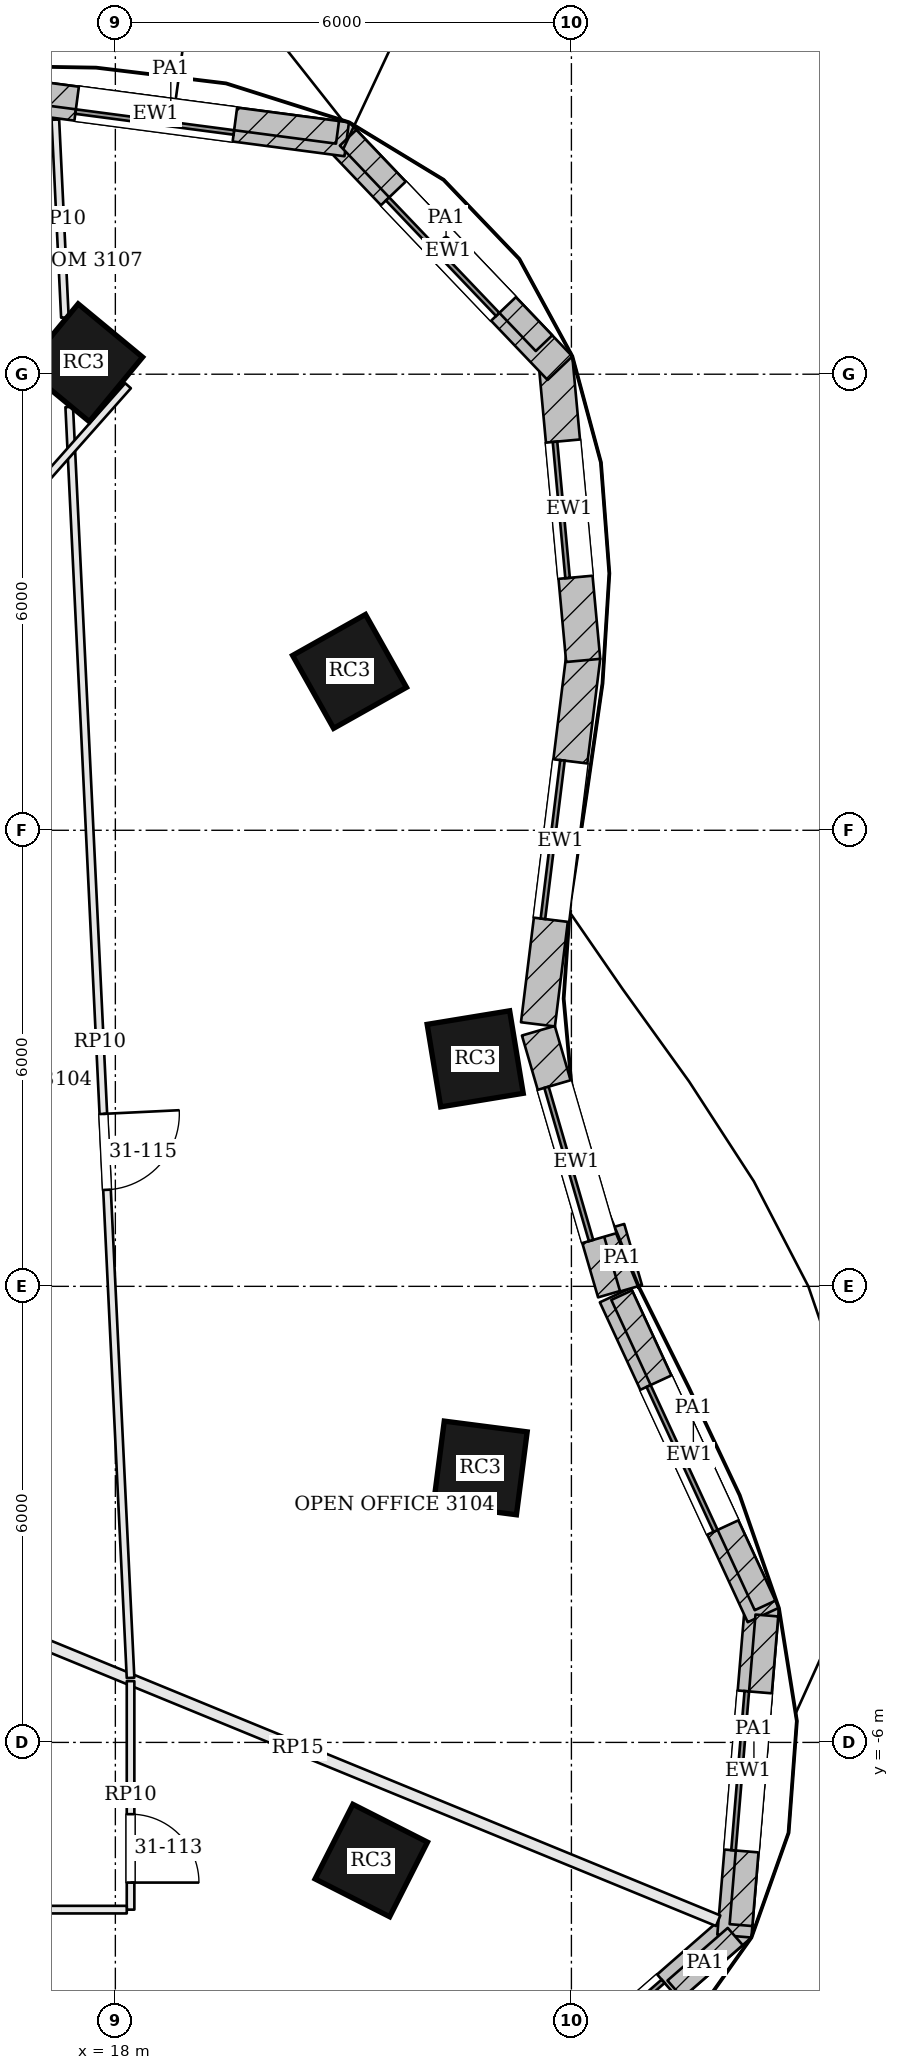
"""IFC4 building model, lengths in metres.
Left out: names, types, materials, properties, quantities, classifications, styles, units other than length and angle.
Written with IfcOpenShell. Run it as: python <this file> out.ifc"""

import sys

from ifc_helpers import new_model, si_unit, direction, frame, frame_2d, origin, origin_2d, place, context, subcontext, project, spatial, rectangle, extrude, element, fill, save


model = new_model("IFC4")
c1 = context("Model", 3, precision=1e-05, world=origin(), true_north=direction((0.0, 1.0)))
c2 = subcontext(c1, "Body", "Model", "MODEL_VIEW")
j1 = project(units=[si_unit("LENGTHUNIT", "METRE"), si_unit("PLANEANGLEUNIT", "RADIAN")], contexts=[c1])
p1 = place(None, origin())
s1 = spatial("IfcSite", under=j1, at=p1, CompositionType="ELEMENT")
p2 = place(p1, origin())
s2 = spatial("IfcBuilding", under=s1, at=p2, CompositionType="ELEMENT")
p3 = place(p2, frame((0.0, 0.0, 130.5)))
s3 = spatial("IfcBuildingStorey", under=s2, at=p3, CompositionType="ELEMENT", Elevation=130.5)
for number, where, z_axis, x_axis in (
    (1, (22.734, 2.993, 0.0), (0.0, 0.0, 1.0), (-0.162, 0.987, 0.0)),
    (2, (21.081, 8.09, 0.0), (0.0, 0.0, 1.0), (-0.49, 0.872, 0.0)),
    (3, (17.584, 12.151, 0.0), (0.0, 0.0, 1.0), (-0.771, 0.637, 0.0)),
    (4, (21.367, -7.554, 0.0), (0.0, 0.0, 1.0), (0.452, 0.892, 0.0)),
    (5, (22.802, -2.389, 0.0), (0.0, 0.0, 1.0), (0.129, 0.992, 0.0)),
):
    element("IfcColumn", number, at=place(p3, frame(where, z_axis=z_axis, x_axis=x_axis)), inside=s3, PredefinedType="COLUMN", context=c2, shape_type="SweptSolid", body=[
        extrude(rectangle(XDim=1.1, YDim=1.1, at=origin_2d()), origin(), (0.0, 0.0, 1.0), 3.9),
    ])
p4 = place(p3, frame((24.567, -0.082, 0.0), z_axis=(0.0, 0.0, 1.0), x_axis=(-0.279202919694, 0.960232122788, 0.0)))
e6 = element("IfcWall", 6, at=p4, inside=s3, PredefinedType="SOLIDWALL", context=c2, shape_type="SweptSolid", body=[
    extrude(rectangle(XDim=3.588, YDim=0.45, at=frame_2d((1.794, 0.0))), origin(), (0.0, 0.0, 1.0), 3.7),
])
p5 = place(p4, frame((0.744, 0.0, 0.9)))
e7 = element("IfcOpeningElement", 7, at=p5, cuts=e6, PredefinedType="OPENING", context=c2, shape_type="SweptSolid", body=[
    extrude(rectangle(XDim=2.1, YDim=2.3, at=frame_2d((1.05, 1.15))), frame((0.0, 0.235, 0.0), z_axis=(0.0, -1.0, 0.0), x_axis=(1.0, 0.0, 0.0)), (0.0, 0.0, 1.0), 0.47),
])
p6 = place(p3, frame((23.56, 3.447, 0.0), z_axis=(0.0, 0.0, 1.0), x_axis=(0.12231391248, 0.992491464353, 0.0)))
e8 = element("IfcWall", 8, at=p6, inside=s3, PredefinedType="SOLIDWALL", context=c2, shape_type="SweptSolid", body=[
    extrude(rectangle(XDim=4.872, YDim=0.45, at=frame_2d((2.436, 0.0))), origin(), (0.0, 0.0, 1.0), 3.7),
])
p7 = place(p6, frame((1.386, 0.0, 0.9)))
e9 = element("IfcOpeningElement", 9, at=p7, cuts=e8, PredefinedType="OPENING", context=c2, shape_type="SweptSolid", body=[
    extrude(rectangle(XDim=2.1, YDim=2.3, at=frame_2d((1.05, 1.15))), frame((0.0, 0.235, 0.0), z_axis=(0.0, -1.0, 0.0), x_axis=(1.0, 0.0, 0.0)), (0.0, 0.0, 1.0), 0.47),
])
p8 = place(p3, frame((24.155, 8.235, 0.0), z_axis=(0.0, 0.0, 1.0), x_axis=(-0.091874058945, 0.995770634882, 0.0)))
e10 = element("IfcWall", 10, at=p8, inside=s3, PredefinedType="SOLIDWALL", context=c2, shape_type="SweptSolid", body=[
    extrude(rectangle(XDim=3.997, YDim=0.45, at=frame_2d((1.998, 0.0))), origin(), (0.0, 0.0, 1.0), 3.7),
])
p9 = place(p8, frame((1.098, 0.0, 0.9)))
e11 = element("IfcOpeningElement", 11, at=p9, cuts=e10, PredefinedType="OPENING", context=c2, shape_type="SweptSolid", body=[
    extrude(rectangle(XDim=1.8, YDim=2.3, at=frame_2d((0.9, 1.15))), frame((0.0, 0.235, 0.0), z_axis=(0.0, -1.0, 0.0), x_axis=(1.0, 0.0, 0.0)), (0.0, 0.0, 1.0), 0.47),
])
p10 = place(p3, frame((23.849, 12.08, 0.0), z_axis=(0.0, 0.0, 1.0), x_axis=(-0.690057851873, 0.723754213161, 0.0)))
e12 = element("IfcWall", 12, at=p10, inside=s3, PredefinedType="SOLIDWALL", context=c2, shape_type="SweptSolid", body=[
    extrude(rectangle(XDim=4.253, YDim=0.45, at=frame_2d((2.126, 0.0))), origin(), (0.0, 0.0, 1.0), 3.7),
])
p11 = place(p10, frame((1.076, 0.0, 0.9)))
e13 = element("IfcOpeningElement", 13, at=p11, cuts=e12, PredefinedType="OPENING", context=c2, shape_type="SweptSolid", body=[
    extrude(rectangle(XDim=2.1, YDim=2.3, at=frame_2d((1.05, 1.15))), frame((0.0, 0.235, 0.0), z_axis=(0.0, -1.0, 0.0), x_axis=(1.0, 0.0, 0.0)), (0.0, 0.0, 1.0), 0.47),
])
p12 = place(p3, frame((21.044, 15.091, 0.0), z_axis=(0.0, 0.0, 1.0), x_axis=(-0.991409967396, 0.130790965086, 0.0)))
e14 = element("IfcWall", 14, at=p12, inside=s3, PredefinedType="SOLIDWALL", context=c2, shape_type="SweptSolid", body=[
    extrude(rectangle(XDim=5.068, YDim=0.45, at=frame_2d((2.534, 0.0))), origin(), (0.0, 0.0, 1.0), 3.7),
])
p13 = place(p12, frame((1.484, 0.0, 0.9)))
e15 = element("IfcOpeningElement", 15, at=p13, cuts=e14, PredefinedType="OPENING", context=c2, shape_type="SweptSolid", body=[
    extrude(rectangle(XDim=2.1, YDim=2.3, at=frame_2d((1.05, 1.15))), frame((0.0, 0.235, 0.0), z_axis=(0.0, -1.0, 0.0), x_axis=(1.0, 0.0, 0.0)), (0.0, 0.0, 1.0), 0.47),
])
p14 = place(p3, frame((22.75, -11.427, 0.0), z_axis=(0.0, 0.0, 1.0), x_axis=(0.753367370231, 0.657599882506, 0.0)))
e16 = element("IfcWall", 16, at=p14, inside=s3, PredefinedType="SOLIDWALL", context=c2, shape_type="SweptSolid", body=[
    extrude(rectangle(XDim=4.607, YDim=0.45, at=frame_2d((2.303, 0.0))), origin(), (0.0, 0.0, 1.0), 3.7),
])
p15 = place(p14, frame((1.253, 0.0, 0.9)))
e17 = element("IfcOpeningElement", 17, at=p15, cuts=e16, PredefinedType="OPENING", context=c2, shape_type="SweptSolid", body=[
    extrude(rectangle(XDim=2.1, YDim=2.3, at=frame_2d((1.05, 1.15))), frame((0.0, 0.235, 0.0), z_axis=(0.0, -1.0, 0.0), x_axis=(1.0, 0.0, 0.0)), (0.0, 0.0, 1.0), 0.47),
])
p16 = place(p3, frame((26.144, -8.548, 0.0), z_axis=(0.0, 0.0, 1.0), x_axis=(0.083268523648, 0.996527146128, 0.0)))
e18 = element("IfcWall", 18, at=p16, inside=s3, PredefinedType="SOLIDWALL", context=c2, shape_type="SweptSolid", body=[
    extrude(rectangle(XDim=4.348, YDim=0.45, at=frame_2d((2.174, 0.0))), origin(), (0.0, 0.0, 1.0), 3.7),
])
p17 = place(p16, frame((1.124, 0.0, 0.9)))
e19 = element("IfcOpeningElement", 19, at=p17, cuts=e18, PredefinedType="OPENING", context=c2, shape_type="SweptSolid", body=[
    extrude(rectangle(XDim=2.1, YDim=2.3, at=frame_2d((1.05, 1.15))), frame((0.0, 0.235, 0.0), z_axis=(0.0, -1.0, 0.0), x_axis=(1.0, 0.0, 0.0)), (0.0, 0.0, 1.0), 0.47),
])
p18 = place(p3, frame((26.524, -4.324, 0.0), z_axis=(0.0, 0.0, 1.0), x_axis=(-0.419579037504, 0.907718806287, 0.0)))
e20 = element("IfcWall", 20, at=p18, inside=s3, PredefinedType="SOLIDWALL", context=c2, shape_type="SweptSolid", body=[
    extrude(rectangle(XDim=4.636, YDim=0.45, at=frame_2d((2.318, 0.0))), origin(), (0.0, 0.0, 1.0), 3.7),
])
p19 = place(p18, frame((1.268, 0.0, 0.9)))
e21 = element("IfcOpeningElement", 21, at=p19, cuts=e20, PredefinedType="OPENING", context=c2, shape_type="SweptSolid", body=[
    extrude(rectangle(XDim=2.1, YDim=2.3, at=frame_2d((1.05, 1.15))), frame((0.0, 0.235, 0.0), z_axis=(0.0, -1.0, 0.0), x_axis=(1.0, 0.0, 0.0)), (0.0, 0.0, 1.0), 0.47),
])
p20 = place(p3, frame((24.785, -0.026, 3.9), z_axis=(0.0, 0.0, 1.0), x_axis=(-0.279261128564, 0.96021519571, 0.0)))
e22 = element("IfcWall", 22, at=p20, inside=s3, PredefinedType="PARAPET", context=c2, shape_type="SweptSolid", body=[
    extrude(rectangle(XDim=0.837, YDim=0.3, at=frame_2d((0.419, 0.0))), origin(), (0.0, 0.0, 1.0), 1.1),
])
p21 = place(p3, frame((23.64, 12.408, 3.9), z_axis=(0.0, 0.0, 1.0), x_axis=(-0.690141419558, 0.723674526987, 0.0)))
e23 = element("IfcWall", 23, at=p21, inside=s3, PredefinedType="PARAPET", context=c2, shape_type="SweptSolid", body=[
    extrude(rectangle(XDim=3.735, YDim=0.3, at=frame_2d((1.867, 0.0))), origin(), (0.0, 0.0, 1.0), 1.1),
])
p22 = place(p3, frame((20.923, 15.182, 3.9), z_axis=(0.0, 0.0, 1.0), x_axis=(-0.991411041714, 0.130782821377, 0.0)))
e24 = element("IfcWall", 24, at=p22, inside=s3, PredefinedType="PARAPET", context=c2, shape_type="SweptSolid", body=[
    extrude(rectangle(XDim=4.424, YDim=0.3, at=frame_2d((2.212, 0.0))), origin(), (0.0, 0.0, 1.0), 1.1),
])
p23 = place(p3, frame((25.362, -9.246, 3.9), z_axis=(0.0, 0.0, 1.0), x_axis=(0.753495699064, 0.657452835945, 0.0)))
e25 = element("IfcWall", 25, at=p23, inside=s3, PredefinedType="PARAPET", context=c2, shape_type="SweptSolid", body=[
    extrude(rectangle(XDim=1.052, YDim=0.3, at=frame_2d((0.526, 0.0))), origin(), (0.0, 0.0, 1.0), 1.1),
])
p24 = place(p3, frame((26.231, -8.404, 3.9), z_axis=(0.0, 0.0, 1.0), x_axis=(0.083203659887, 0.996532563934, 0.0)))
e26 = element("IfcWall", 26, at=p24, inside=s3, PredefinedType="PARAPET", context=c2, shape_type="SweptSolid", body=[
    extrude(rectangle(XDim=4.087, YDim=0.3, at=frame_2d((2.044, 0.0))), origin(), (0.0, 0.0, 1.0), 1.1),
])
p25 = place(p3, frame((26.548, -4.198, 3.9), z_axis=(0.0, 0.0, 1.0), x_axis=(-0.419598608408, 0.907709759682, 0.0)))
e27 = element("IfcWall", 27, at=p25, inside=s3, PredefinedType="PARAPET", context=c2, shape_type="SweptSolid", body=[
    extrude(rectangle(XDim=4.497, YDim=0.3, at=frame_2d((2.249, 0.0))), origin(), (0.0, 0.0, 1.0), 1.1),
])
p26 = place(p3, frame((25.931, -8.346, 0.0), z_axis=(0.0, 0.0, 1.0), x_axis=(-0.92507887737, 0.379775026355, 0.0)))
e28 = element("IfcWall", 28, at=p26, inside=s3, PredefinedType="PARTITIONING", context=c2, shape_type="SweptSolid", body=[
    extrude(rectangle(XDim=11.957, YDim=0.15, at=frame_2d((5.979, 0.0))), origin(), (0.0, 0.0, 1.0), 3.198),
])
p27 = place(p3, frame((18.2, -5.194, 0.0), z_axis=(0.0, 0.0, 1.0), x_axis=(0.0, -1.0, 0.0)))
e29 = element("IfcWall", 29, at=p27, inside=s3, PredefinedType="PARTITIONING", context=c2, shape_type="SweptSolid", body=[
    extrude(rectangle(XDim=3.006, YDim=0.1, at=frame_2d((1.503, 0.0))), origin(), (0.0, 0.0, 1.0), 3.184),
])
p28 = place(p27, frame((1.75, 0.0, 0.0)))
e30 = element("IfcOpeningElement", 30, at=p28, cuts=e29, PredefinedType="OPENING", context=c2, shape_type="SweptSolid", body=[
    extrude(rectangle(XDim=0.9, YDim=2.1, at=frame_2d((0.45, 1.05))), frame((0.0, 0.06, 0.0), z_axis=(0.0, -1.0, 0.0), x_axis=(1.0, 0.0, 0.0)), (0.0, 0.0, 1.0), 0.12),
])
p29 = place(p3, frame((18.15, -8.2, 0.0), z_axis=(0.0, 0.0, 1.0), x_axis=(-1.0, 0.0, 0.0)))
e31 = element("IfcWall", 31, at=p29, inside=s3, PredefinedType="PARTITIONING", context=c2, shape_type="SweptSolid", body=[
    extrude(rectangle(XDim=23.115, YDim=0.1, at=frame_2d((11.557, 0.0))), origin(), (0.0, 0.0, 1.0), 3.184),
])
p30 = place(p29, frame((17.123, 0.0, 0.0)))
e32 = element("IfcOpeningElement", 32, at=p30, cuts=e31, PredefinedType="OPENING", context=c2, shape_type="SweptSolid", body=[
    extrude(rectangle(XDim=1.0, YDim=2.1, at=frame_2d((0.5, 1.05))), frame((0.0, 0.06, 0.0), z_axis=(0.0, -1.0, 0.0), x_axis=(1.0, 0.0, 0.0)), (0.0, 0.0, 1.0), 0.12),
])
p31 = place(p3, frame((17.211, 15.349, 0.0), z_axis=(0.0, 0.0, 1.0), x_axis=(0.048152668687, -0.998839987435, 0.0)))
e33 = element("IfcWall", 33, at=p31, inside=s3, PredefinedType="PARTITIONING", context=c2, shape_type="SweptSolid", body=[
    extrude(rectangle(XDim=2.606, YDim=0.1, at=frame_2d((1.303, 0.0))), origin(), (0.0, 0.0, 1.0), 3.184),
])
p32 = place(p3, frame((17.393, 11.569, 0.0), z_axis=(0.0, 0.0, 1.0), x_axis=(0.048202645711, -0.998837576859, 0.0)))
e34 = element("IfcWall", 34, at=p32, inside=s3, PredefinedType="PARTITIONING", context=c2, shape_type="SweptSolid", body=[
    extrude(rectangle(XDim=16.74, YDim=0.1, at=frame_2d((8.37, 0.0))), origin(), (0.0, 0.0, 1.0), 3.184),
])
p33 = place(p32, frame((9.311, 0.0, 0.0)))
e35 = element("IfcOpeningElement", 35, at=p33, cuts=e34, PredefinedType="OPENING", context=c2, shape_type="SweptSolid", body=[
    extrude(rectangle(XDim=1.0, YDim=2.1, at=frame_2d((0.5, 1.05))), frame((0.0, 0.06, 0.0), z_axis=(0.0, -1.0, 0.0), x_axis=(1.0, 0.0, 0.0)), (0.0, 0.0, 1.0), 0.12),
])
p34 = place(p3, frame((14.85, 8.106, 0.0), z_axis=(0.0, 0.0, 1.0), x_axis=(0.663305650233, 0.748348591479, 0.0)))
e36 = element("IfcWall", 36, at=p34, inside=s3, PredefinedType="PARTITIONING", context=c2, shape_type="SweptSolid", body=[
    extrude(rectangle(XDim=5.001, YDim=0.1, at=frame_2d((2.5, 0.0))), origin(), (0.0, 0.0, 1.0), 3.184),
])
p35 = place(p5, origin())
e37 = element("IfcWindow", 37, at=p35, inside=s3, PartitioningType="SINGLE_PANEL", PredefinedType="WINDOW", context=c2, shape_type="SweptSolid", body=[
    extrude(rectangle(XDim=2.1, YDim=2.3, at=frame_2d((1.05, 1.15))), frame((0.0, 0.135, 0.0), z_axis=(0.0, -1.0, 0.0), x_axis=(1.0, 0.0, 0.0)), (0.0, 0.0, 1.0), 0.06),
])
fill(e7, e37)
p36 = place(p7, origin())
e38 = element("IfcWindow", 38, at=p36, inside=s3, PartitioningType="SINGLE_PANEL", PredefinedType="WINDOW", context=c2, shape_type="SweptSolid", body=[
    extrude(rectangle(XDim=2.1, YDim=2.3, at=frame_2d((1.05, 1.15))), frame((0.0, 0.135, 0.0), z_axis=(0.0, -1.0, 0.0), x_axis=(1.0, 0.0, 0.0)), (0.0, 0.0, 1.0), 0.06),
])
fill(e9, e38)
p37 = place(p9, origin())
e39 = element("IfcWindow", 39, at=p37, inside=s3, PartitioningType="SINGLE_PANEL", PredefinedType="WINDOW", context=c2, shape_type="SweptSolid", body=[
    extrude(rectangle(XDim=1.8, YDim=2.3, at=frame_2d((0.9, 1.15))), frame((0.0, 0.135, 0.0), z_axis=(0.0, -1.0, 0.0), x_axis=(1.0, 0.0, 0.0)), (0.0, 0.0, 1.0), 0.06),
])
fill(e11, e39)
p38 = place(p11, origin())
e40 = element("IfcWindow", 40, at=p38, inside=s3, PartitioningType="SINGLE_PANEL", PredefinedType="WINDOW", context=c2, shape_type="SweptSolid", body=[
    extrude(rectangle(XDim=2.1, YDim=2.3, at=frame_2d((1.05, 1.15))), frame((0.0, 0.135, 0.0), z_axis=(0.0, -1.0, 0.0), x_axis=(1.0, 0.0, 0.0)), (0.0, 0.0, 1.0), 0.06),
])
fill(e13, e40)
p39 = place(p13, origin())
e41 = element("IfcWindow", 41, at=p39, inside=s3, PartitioningType="SINGLE_PANEL", PredefinedType="WINDOW", context=c2, shape_type="SweptSolid", body=[
    extrude(rectangle(XDim=2.1, YDim=2.3, at=frame_2d((1.05, 1.15))), frame((0.0, 0.135, 0.0), z_axis=(0.0, -1.0, 0.0), x_axis=(1.0, 0.0, 0.0)), (0.0, 0.0, 1.0), 0.06),
])
fill(e15, e41)
p40 = place(p15, origin())
e42 = element("IfcWindow", 42, at=p40, inside=s3, PartitioningType="SINGLE_PANEL", PredefinedType="WINDOW", context=c2, shape_type="SweptSolid", body=[
    extrude(rectangle(XDim=2.1, YDim=2.3, at=frame_2d((1.05, 1.15))), frame((0.0, 0.135, 0.0), z_axis=(0.0, -1.0, 0.0), x_axis=(1.0, 0.0, 0.0)), (0.0, 0.0, 1.0), 0.06),
])
fill(e17, e42)
p41 = place(p17, origin())
e43 = element("IfcWindow", 43, at=p41, inside=s3, PartitioningType="SINGLE_PANEL", PredefinedType="WINDOW", context=c2, shape_type="SweptSolid", body=[
    extrude(rectangle(XDim=2.1, YDim=2.3, at=frame_2d((1.05, 1.15))), frame((0.0, 0.135, 0.0), z_axis=(0.0, -1.0, 0.0), x_axis=(1.0, 0.0, 0.0)), (0.0, 0.0, 1.0), 0.06),
])
fill(e19, e43)
p42 = place(p19, origin())
e44 = element("IfcWindow", 44, at=p42, inside=s3, PartitioningType="SINGLE_PANEL", PredefinedType="WINDOW", context=c2, shape_type="SweptSolid", body=[
    extrude(rectangle(XDim=2.1, YDim=2.3, at=frame_2d((1.05, 1.15))), frame((0.0, 0.135, 0.0), z_axis=(0.0, -1.0, 0.0), x_axis=(1.0, 0.0, 0.0)), (0.0, 0.0, 1.0), 0.06),
])
fill(e21, e44)
p43 = place(p28, origin())
e45 = element("IfcDoor", 45, at=p43, inside=s3, OperationType="SINGLE_SWING_RIGHT", PredefinedType="DOOR", context=c2, shape_type="SweptSolid", body=[
    extrude(rectangle(XDim=0.9, YDim=2.1, at=frame_2d((0.45, 1.05))), frame((0.0, 0.025, 0.0), z_axis=(0.0, -1.0, 0.0), x_axis=(1.0, 0.0, 0.0)), (0.0, 0.0, 1.0), 0.05),
])
fill(e30, e45)
p44 = place(p33, origin())
e46 = element("IfcDoor", 46, at=p44, inside=s3, OperationType="SINGLE_SWING_LEFT", PredefinedType="DOOR", context=c2, shape_type="SweptSolid", body=[
    extrude(rectangle(XDim=1.0, YDim=2.1, at=frame_2d((0.5, 1.05))), frame((0.0, 0.025, 0.0), z_axis=(0.0, -1.0, 0.0), x_axis=(1.0, 0.0, 0.0)), (0.0, 0.0, 1.0), 0.05),
])
fill(e35, e46)
save(model, sys.argv[1])
